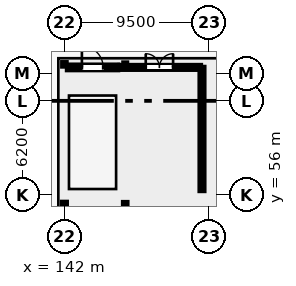
"""IFC4 building model, lengths in metres.
Left out: names, types, materials, properties, quantities, classifications, styles, units other than length and angle.
Written with IfcOpenShell. Run it as: python <this file> out.ifc"""

import sys

from ifc_helpers import new_model, si_unit, direction, frame, frame_2d, origin, origin_2d, place, context, subcontext, project, spatial, rectangle, hollow_rectangle, i_section, extrude, element, fill, save


model = new_model("IFC4")
c1 = context("Model", 3, precision=1e-05, world=origin(), true_north=direction((0.0, 1.0)))
c2 = subcontext(c1, "Body", "Model", "MODEL_VIEW")
j1 = project(units=[si_unit("LENGTHUNIT", "METRE"), si_unit("PLANEANGLEUNIT", "RADIAN")], contexts=[c1])
p1 = place(None, origin())
s1 = spatial("IfcSite", under=j1, at=p1, CompositionType="ELEMENT")
p2 = place(p1, origin())
s2 = spatial("IfcBuilding", under=s1, at=p2, CompositionType="ELEMENT")
p3 = place(p2, origin())
s3 = spatial("IfcBuildingStorey", under=s2, at=p3, CompositionType="ELEMENT", Elevation=0.0)
p4 = place(p3, frame((142.0, 55.4, 0.0), z_axis=(0.0, 0.0, 1.0), x_axis=(1.0, 0.0, 0.0)))
e1 = element("IfcColumn", 1, at=p4, inside=s3, PredefinedType="COLUMN", context=c2, shape_type="SweptSolid", body=[
    extrude(i_section(OverallWidth=0.25, OverallDepth=0.25, WebThickness=0.009, FlangeThickness=0.01, at=origin_2d()), origin(), (0.0, 0.0, 1.0), 4.26),
])
for number, where, z_axis, x_axis in (
    (2, (142.0, 64.6, 0.0), (0.0, 0.0, 1.0), (1.0, 0.0, 0.0)),
    (3, (146.0, 55.4, 0.0), (0.0, 0.0, 1.0), (1.0, 0.0, 0.0)),
):
    element("IfcColumn", number, at=place(p3, frame(where, z_axis=z_axis, x_axis=x_axis)), inside=s3, PredefinedType="COLUMN", context=c2, shape_type="SweptSolid", body=[
        extrude(hollow_rectangle(XDim=0.22, YDim=0.22, WallThickness=0.008, at=origin_2d()), origin(), (0.0, 0.0, 1.0), 4.26),
    ])
p5 = place(p3, frame((146.0, 64.6, 0.0), z_axis=(0.0, 0.0, 1.0), x_axis=(1.0, 0.0, 0.0)))
e4 = element("IfcColumn", 4, at=p5, inside=s3, PredefinedType="COLUMN", context=c2, shape_type="SweptSolid", body=[
    extrude(hollow_rectangle(XDim=0.18, YDim=0.18, WallThickness=0.008, at=origin_2d()), origin(), (0.0, 0.0, 1.0), 4.26),
])
for number, where, z_axis, x_axis in (
    (5, (142.2, 56.3, 0.0), (0.0, 0.0, 1.0), (0.0, 1.0, 0.0)),
    (6, (145.5, 56.3, 0.0), (0.0, 0.0, 1.0), (0.0, 1.0, 0.0)),
):
    element("IfcWall", number, at=place(p3, frame(where, z_axis=z_axis, x_axis=x_axis)), inside=s3, PredefinedType="STANDARD", context=c2, shape_type="SweptSolid", body=[
        extrude(rectangle(XDim=8.1, YDim=0.2, at=frame_2d((4.05, 0.0))), origin(), (0.0, 0.0, 1.0), 4.18),
    ])
p6 = place(p3, frame((142.3, 56.3, 0.0), z_axis=(0.0, 0.0, 1.0), x_axis=(1.0, 0.0, 0.0)))
e7 = element("IfcWall", 7, at=p6, inside=s3, PredefinedType="STANDARD", context=c2, shape_type="SweptSolid", body=[
    extrude(rectangle(XDim=3.1, YDim=0.2, at=frame_2d((1.55, 0.0))), origin(), (0.0, 0.0, 1.0), 4.18),
])
p7 = place(p3, frame((151.05, 56.3, 0.0), z_axis=(0.0, 0.0, 1.0), x_axis=(0.0, 1.0, 0.0)))
e8 = element("IfcWall", 8, at=p7, inside=s3, PredefinedType="STANDARD", context=c2, shape_type="SweptSolid", body=[
    extrude(rectangle(XDim=8.1, YDim=0.25, at=frame_2d((4.05, 0.0))), origin(), (0.0, 0.0, 1.0), 4.18),
])
p8 = place(p3, frame((145.65, 64.4, 0.0), z_axis=(0.0, 0.0, 1.0), x_axis=(1.0, 0.0, 0.0)))
e9 = element("IfcWall", 9, at=p8, inside=s3, PredefinedType="STANDARD", context=c2, shape_type="SweptSolid", body=[
    extrude(rectangle(XDim=5.3, YDim=0.25, at=frame_2d((2.65, 0.0))), origin(), (0.0, 0.0, 1.0), 4.18),
])
p9 = place(p8, frame((1.7, 0.0, 0.0)))
e10 = element("IfcOpeningElement", 10, at=p9, cuts=e9, PredefinedType="OPENING", context=c2, shape_type="SweptSolid", body=[
    extrude(rectangle(XDim=1.8, YDim=2.2, at=frame_2d((0.9, 1.1))), frame((0.0, 0.135, 0.0), z_axis=(0.0, -1.0, 0.0), x_axis=(1.0, 0.0, 0.0)), (0.0, 0.0, 1.0), 0.27),
])
p10 = place(p3, frame((142.2, 64.4, 0.0), z_axis=(0.0, 0.0, 1.0), x_axis=(1.0, 0.0, 0.0)))
e11 = element("IfcWall", 11, at=p10, inside=s3, PredefinedType="STANDARD", context=c2, shape_type="SweptSolid", body=[
    extrude(rectangle(XDim=3.3, YDim=0.3, at=frame_2d((1.65, 0.0))), origin(), (0.0, 0.0, 1.0), 4.1),
])
p11 = place(p10, frame((0.95, 0.0, 0.0)))
e12 = element("IfcOpeningElement", 12, at=p11, cuts=e11, PredefinedType="OPENING", context=c2, shape_type="SweptSolid", body=[
    extrude(rectangle(XDim=1.4, YDim=2.15, at=frame_2d((0.7, 1.075))), frame((0.0, 0.16, 0.0), z_axis=(0.0, -1.0, 0.0), x_axis=(1.0, 0.0, 0.0)), (0.0, 0.0, 1.0), 0.32),
])
p12 = place(p11, origin())
e13 = element("IfcDoor", 13, at=p12, inside=s3, OperationType="SINGLE_SWING_LEFT", PredefinedType="DOOR", context=c2, shape_type="SweptSolid", body=[
    extrude(rectangle(XDim=1.4, YDim=2.15, at=frame_2d((0.7, 1.075))), frame((0.0, 0.025, 0.0), z_axis=(0.0, -1.0, 0.0), x_axis=(1.0, 0.0, 0.0)), (0.0, 0.0, 1.0), 0.05),
])
fill(e12, e13)
p13 = place(p9, origin())
e14 = element("IfcDoor", 14, at=p13, inside=s3, OperationType="DOUBLE_DOOR_SINGLE_SWING", PredefinedType="DOOR", context=c2, shape_type="SweptSolid", body=[
    extrude(rectangle(XDim=1.8, YDim=2.2, at=frame_2d((0.9, 1.1))), frame((0.0, 0.025, 0.0), z_axis=(0.0, -1.0, 0.0), x_axis=(1.0, 0.0, 0.0)), (0.0, 0.0, 1.0), 0.05),
])
fill(e10, e14)
save(model, sys.argv[1])
